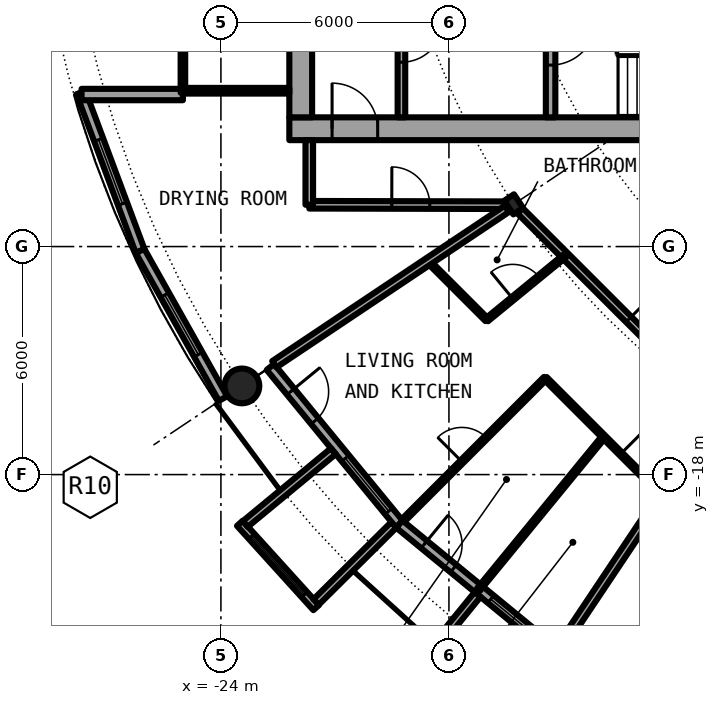
"""IFC4 building model, lengths in metres.
Left out: names, types, materials, properties, quantities, classifications, styles, units other than length and angle.
Written with IfcOpenShell. Run it as: python <this file> out.ifc"""

import sys

from ifc_helpers import new_model, si_unit, direction, frame, frame_2d, origin, origin_2d, place, context, subcontext, project, spatial, rectangle, circle, hollow_circle, i_section, extrude, element, fill, save


model = new_model("IFC4")
c1 = context("Model", 3, precision=1e-05, world=origin(), true_north=direction((0.0, 1.0)))
c2 = subcontext(c1, "Body", "Model", "MODEL_VIEW")
j1 = project(units=[si_unit("LENGTHUNIT", "METRE"), si_unit("PLANEANGLEUNIT", "RADIAN")], contexts=[c1])
p1 = place(None, origin())
s1 = spatial("IfcSite", under=j1, at=p1, CompositionType="ELEMENT")
p2 = place(p1, origin())
s2 = spatial("IfcBuilding", under=s1, at=p2, CompositionType="ELEMENT")
p3 = place(p2, frame((0.0, 0.0, 123.85)))
s3 = spatial("IfcBuildingStorey", under=s2, at=p3, CompositionType="ELEMENT", Elevation=123.85)
p4 = place(p3, frame((-23.448, -15.667, 0.0), z_axis=(0.0, 0.0, 1.0), x_axis=(1.0, 0.0, 0.0)))
e1 = element("IfcColumn", 1, at=p4, inside=s3, PredefinedType="COLUMN", context=c2, shape_type="SweptSolid", body=[
    extrude(hollow_circle(Radius=0.457, WallThickness=0.04, at=origin_2d()), origin(), (0.0, 0.0, 1.0), 3.05),
])
p5 = place(p3, frame((-16.297, -10.889, 0.0), z_axis=(0.0, 0.0, 1.0), x_axis=(-0.831469612303, -0.55557023302, 0.0)))
e2 = element("IfcColumn", 2, at=p5, inside=s3, PredefinedType="COLUMN", context=c2, shape_type="SweptSolid", body=[
    extrude(i_section(OverallWidth=0.307, OverallDepth=0.432, WebThickness=0.021, FlangeThickness=0.04, FilletRadius=0.027, at=origin_2d()), origin(), (0.0, 0.0, 1.0), 3.05),
])
p6 = place(p3, frame((-22.699, -15.167, 0.0), z_axis=(0.0, 0.0, 1.0), x_axis=(0.634382322723, -0.773019449054, 0.0)))
e3 = element("IfcWall", 3, at=p6, inside=s3, PredefinedType="SOLIDWALL", context=c2, shape_type="SweptSolid", body=[
    extrude(rectangle(XDim=5.352, YDim=0.25, at=frame_2d((2.676, 0.0))), origin(), (0.0, 0.0, 1.0), 2.7),
])
p7 = place(p6, frame((0.841, 0.0, 0.0)))
e4 = element("IfcOpeningElement", 4, at=p7, cuts=e3, PredefinedType="OPENING", context=c2, shape_type="SweptSolid", body=[
    extrude(rectangle(XDim=1.0, YDim=2.2, at=frame_2d((0.5, 1.1))), frame((0.0, 0.135, 0.0), z_axis=(0.0, -1.0, 0.0), x_axis=(1.0, 0.0, 0.0)), (0.0, 0.0, 1.0), 0.27),
])
p8 = place(p6, frame((3.111, 0.0, 0.3)))
e5 = element("IfcOpeningElement", 5, at=p8, cuts=e3, PredefinedType="OPENING", context=c2, shape_type="SweptSolid", body=[
    extrude(rectangle(XDim=1.8, YDim=2.1, at=frame_2d((0.9, 1.05))), frame((0.0, 0.135, 0.0), z_axis=(0.0, -1.0, 0.0), x_axis=(1.0, 0.0, 0.0)), (0.0, 0.0, 1.0), 0.27),
])
p9 = place(p3, frame((-23.503, -19.282, -0.03), z_axis=(0.0, 0.0, 1.0), x_axis=(0.671506829416, -0.740998365753, 0.0)))
e6 = element("IfcWall", 6, at=p9, inside=s3, PredefinedType="SOLIDWALL", context=c2, shape_type="SweptSolid", body=[
    extrude(rectangle(XDim=2.993, YDim=0.2, at=frame_2d((1.497, 0.0))), origin(), (0.0, 0.0, 1.0), 2.73),
])
p10 = place(p9, frame((0.457, 0.0, 0.33)))
e7 = element("IfcOpeningElement", 7, at=p10, cuts=e6, PredefinedType="OPENING", context=c2, shape_type="SweptSolid", body=[
    extrude(circle(Radius=1.04, at=frame_2d((1.04, 1.04))), frame((0.0, 0.11, 0.0), z_axis=(0.0, -1.0, 0.0), x_axis=(1.0, 0.0, 0.0)), (0.0, 0.0, 1.0), 0.22),
])
p11 = place(p3, frame((-21.041, -17.384, -0.03), z_axis=(0.0, 0.0, 1.0), x_axis=(-0.770784861449, -0.63709551667, 0.0)))
e8 = element("IfcWall", 8, at=p11, inside=s3, PredefinedType="SOLIDWALL", context=c2, shape_type="SweptSolid", body=[
    extrude(rectangle(XDim=3.006, YDim=0.2, at=frame_2d((1.503, 0.0))), origin(), (0.0, 0.0, 1.0), 2.73),
])
p12 = place(p3, frame((-19.45, -19.323, -0.03), z_axis=(0.0, 0.0, 1.0), x_axis=(-0.709727076896, -0.704476739375, 0.0)))
e9 = element("IfcWall", 9, at=p12, inside=s3, PredefinedType="SOLIDWALL", context=c2, shape_type="SweptSolid", body=[
    extrude(rectangle(XDim=2.883, YDim=0.2, at=frame_2d((1.441, 0.0))), origin(), (0.0, 0.0, 1.0), 2.73),
])
p13 = place(p3, frame((-19.304, -19.304, 0.0), z_axis=(0.0, 0.0, 1.0), x_axis=(0.773019449054, -0.634382322723, 0.0)))
e10 = element("IfcWall", 10, at=p13, inside=s3, PredefinedType="SOLIDWALL", context=c2, shape_type="SweptSolid", body=[
    extrude(rectangle(XDim=5.352, YDim=0.25, at=frame_2d((2.676, 0.0))), origin(), (0.0, 0.0, 1.0), 2.7),
])
p14 = place(p13, frame((0.841, 0.0, 0.0)))
e11 = element("IfcOpeningElement", 11, at=p14, cuts=e10, PredefinedType="OPENING", context=c2, shape_type="SweptSolid", body=[
    extrude(rectangle(XDim=1.0, YDim=2.2, at=frame_2d((0.5, 1.1))), frame((0.0, 0.135, 0.0), z_axis=(0.0, -1.0, 0.0), x_axis=(1.0, 0.0, 0.0)), (0.0, 0.0, 1.0), 0.27),
])
p15 = place(p13, frame((3.111, 0.0, 0.3)))
e12 = element("IfcOpeningElement", 12, at=p15, cuts=e10, PredefinedType="OPENING", context=c2, shape_type="SweptSolid", body=[
    extrude(rectangle(XDim=1.8, YDim=2.1, at=frame_2d((0.9, 1.05))), frame((0.0, 0.135, 0.0), z_axis=(0.0, -1.0, 0.0), x_axis=(1.0, 0.0, 0.0)), (0.0, 0.0, 1.0), 0.27),
])
p16 = place(p3, frame((-17.246, -21.155, -0.03), z_axis=(0.0, 0.0, 1.0), x_axis=(-0.631741648902, -0.775179004516, 0.0)))
e13 = element("IfcWall", 13, at=p16, inside=s3, PredefinedType="SOLIDWALL", context=c2, shape_type="SweptSolid", body=[
    extrude(rectangle(XDim=3.006, YDim=0.2, at=frame_2d((1.503, 0.0))), origin(), (0.0, 0.0, 1.0), 2.73),
])
p17 = place(p3, frame((-27.682, -7.945, 0.0), z_axis=(0.0, 0.0, 1.0), x_axis=(0.349247811493, -0.937030397675, 0.0)))
e14 = element("IfcWall", 14, at=p17, inside=s3, PredefinedType="SOLIDWALL", context=c2, shape_type="SweptSolid", body=[
    extrude(rectangle(XDim=4.452, YDim=0.25, at=frame_2d((2.226, 0.0))), origin(), (0.0, 0.0, 1.0), 2.7),
])
p18 = place(p17, frame((1.327, 0.0, 0.3)))
e15 = element("IfcOpeningElement", 15, at=p18, cuts=e14, PredefinedType="OPENING", context=c2, shape_type="SweptSolid", body=[
    extrude(rectangle(XDim=1.8, YDim=2.1, at=frame_2d((0.9, 1.05))), frame((0.0, 0.135, 0.0), z_axis=(0.0, -1.0, 0.0), x_axis=(1.0, 0.0, 0.0)), (0.0, 0.0, 1.0), 0.27),
])
p19 = place(p3, frame((-26.127, -12.117, 0.0), z_axis=(0.0, 0.0, 1.0), x_axis=(0.489696356642, -0.871893042919, 0.0)))
e16 = element("IfcWall", 16, at=p19, inside=s3, PredefinedType="SOLIDWALL", context=c2, shape_type="SweptSolid", body=[
    extrude(rectangle(XDim=4.454, YDim=0.25, at=frame_2d((2.227, 0.0))), origin(), (0.0, 0.0, 1.0), 2.7),
])
p20 = place(p19, frame((1.327, 0.0, 0.3)))
e17 = element("IfcOpeningElement", 17, at=p20, cuts=e16, PredefinedType="OPENING", context=c2, shape_type="SweptSolid", body=[
    extrude(rectangle(XDim=1.8, YDim=2.1, at=frame_2d((0.9, 1.05))), frame((0.0, 0.135, 0.0), z_axis=(0.0, -1.0, 0.0), x_axis=(1.0, 0.0, 0.0)), (0.0, 0.0, 1.0), 0.27),
])
p21 = place(p3, frame((-25.0, -8.0, 0.0), z_axis=(0.0, 0.0, 1.0), x_axis=(-1.0, 0.0, 0.0)))
e18 = element("IfcWall", 18, at=p21, inside=s3, PredefinedType="SOLIDWALL", context=c2, shape_type="SweptSolid", body=[
    extrude(rectangle(XDim=2.667, YDim=0.3, at=frame_2d((1.333, 0.0))), origin(), (0.0, 0.0, 1.0), 2.7),
])
p22 = place(p3, frame((-22.2, -8.9, 0.0), z_axis=(0.0, 0.0, 1.0), x_axis=(1.0, 0.0, 0.0)))
e19 = element("IfcWall", 19, at=p22, inside=s3, PredefinedType="SHEAR", context=c2, shape_type="SweptSolid", body=[
    extrude(rectangle(XDim=13.8, YDim=0.6, at=frame_2d((6.9, 0.0))), origin(), (0.0, 0.0, 1.0), 3.05),
])
p23 = place(p22, frame((1.125, 0.0, 0.0)))
e20 = element("IfcOpeningElement", 20, at=p23, cuts=e19, PredefinedType="OPENING", context=c2, shape_type="SweptSolid", body=[
    extrude(rectangle(XDim=1.2, YDim=2.3, at=frame_2d((0.6, 1.15))), frame((0.0, 0.31, 0.0), z_axis=(0.0, -1.0, 0.0), x_axis=(1.0, 0.0, 0.0)), (0.0, 0.0, 1.0), 0.62),
])
p24 = place(p3, frame((-21.9, -8.6, 0.0), z_axis=(0.0, 0.0, 1.0), x_axis=(0.0, 1.0, 0.0)))
e21 = element("IfcWall", 21, at=p24, inside=s3, PredefinedType="SHEAR", context=c2, shape_type="SweptSolid", body=[
    extrude(rectangle(XDim=17.2, YDim=0.6, at=frame_2d((8.6, 0.0))), origin(), (0.0, 0.0, 1.0), 3.05),
])
p25 = place(p24, frame((7.7, 0.0, 0.0)))
e22 = element("IfcOpeningElement", 22, at=p25, cuts=e21, PredefinedType="OPENING", context=c2, shape_type="SweptSolid", body=[
    extrude(rectangle(XDim=1.8, YDim=2.3, at=frame_2d((0.9, 1.15))), frame((0.0, 0.31, 0.0), z_axis=(0.0, -1.0, 0.0), x_axis=(1.0, 0.0, 0.0)), (0.0, 0.0, 1.0), 0.62),
])
p26 = place(p3, frame((-15.325, -4.65, 0.0), z_axis=(0.0, 0.0, 1.0), x_axis=(0.0, -1.0, 0.0)))
e23 = element("IfcWall", 23, at=p26, inside=s3, PredefinedType="SHEAR", context=c2, shape_type="SweptSolid", body=[
    extrude(rectangle(XDim=3.95, YDim=0.25, at=frame_2d((1.975, 0.0))), origin(), (0.0, 0.0, 1.0), 3.05),
])
p27 = place(p26, frame((1.375, 0.0, 0.0)))
e24 = element("IfcOpeningElement", 24, at=p27, cuts=e23, PredefinedType="OPENING", context=c2, shape_type="SweptSolid", body=[
    extrude(rectangle(XDim=1.2, YDim=2.3, at=frame_2d((0.6, 1.15))), frame((0.0, 0.135, 0.0), z_axis=(0.0, -1.0, 0.0), x_axis=(1.0, 0.0, 0.0)), (0.0, 0.0, 1.0), 0.27),
])
p28 = place(p3, frame((-19.25, -1.575, 0.0), z_axis=(0.0, 0.0, 1.0), x_axis=(0.0, -1.0, 0.0)))
e25 = element("IfcWall", 25, at=p28, inside=s3, PredefinedType="SOLIDWALL", context=c2, shape_type="SweptSolid", body=[
    extrude(rectangle(XDim=7.025, YDim=0.2, at=frame_2d((3.513, 0.0))), origin(), (0.0, 0.0, 1.0), 2.7),
])
p29 = place(p28, frame((4.475, 0.0, 0.0)))
e26 = element("IfcOpeningElement", 26, at=p29, cuts=e25, PredefinedType="OPENING", context=c2, shape_type="SweptSolid", body=[
    extrude(rectangle(XDim=1.1, YDim=2.3, at=frame_2d((0.55, 1.15))), frame((0.0, 0.11, 0.0), z_axis=(0.0, -1.0, 0.0), x_axis=(1.0, 0.0, 0.0)), (0.0, 0.0, 1.0), 0.22),
])
p30 = place(p3, frame((-22.2, -7.9, 0.0), z_axis=(0.0, 0.0, 1.0), x_axis=(-1.0, 0.0, 0.0)))
e27 = element("IfcWall", 27, at=p30, inside=s3, PredefinedType="PARTITIONING", context=c2, shape_type="SweptSolid", body=[
    extrude(rectangle(XDim=2.74, YDim=0.15, at=frame_2d((1.37, 0.0))), origin(), (0.0, 0.0, 1.0), 2.7),
])
p31 = place(p3, frame((-25.0, 7.95, 0.0), z_axis=(0.0, 0.0, 1.0), x_axis=(0.0, -1.0, 0.0)))
e28 = element("IfcWall", 28, at=p31, inside=s3, PredefinedType="PARTITIONING", context=c2, shape_type="SweptSolid", body=[
    extrude(rectangle(XDim=15.9, YDim=0.12, at=frame_2d((7.95, 0.0))), origin(), (0.0, 0.0, 1.0), 2.7),
])
p32 = place(p31, frame((0.95, 0.0, 0.1)))
e29 = element("IfcOpeningElement", 29, at=p32, cuts=e28, PredefinedType="OPENING", context=c2, shape_type="SweptSolid", body=[
    extrude(rectangle(XDim=14.0, YDim=2.35, at=frame_2d((7.0, 1.175))), frame((0.0, 0.07, 0.0), z_axis=(0.0, -1.0, 0.0), x_axis=(1.0, 0.0, 0.0)), (0.0, 0.0, 1.0), 0.14),
])
p33 = place(p3, frame((-18.542, -12.389, 0.0), z_axis=(0.0, 0.0, 1.0), x_axis=(0.707106781187, -0.707106781187, 0.0)))
e30 = element("IfcWall", 30, at=p33, inside=s3, PredefinedType="PARTITIONING", context=c2, shape_type="SweptSolid", body=[
    extrude(rectangle(XDim=2.175, YDim=0.1, at=frame_2d((1.088, 0.0))), origin(), (0.0, 0.0, 1.0), 2.7),
])
p34 = place(p3, frame((-15.463, -15.468, 0.0), z_axis=(0.0, 0.0, 1.0), x_axis=(0.707106781187, -0.707106781187, 0.0)))
e31 = element("IfcWall", 31, at=p34, inside=s3, PredefinedType="PARTITIONING", context=c2, shape_type="SweptSolid", body=[
    extrude(rectangle(XDim=4.351, YDim=0.1, at=frame_2d((2.176, 0.0))), origin(), (0.0, 0.0, 1.0), 2.7),
])
p35 = place(p34, frame((2.808, 0.0, 0.0)))
e32 = element("IfcOpeningElement", 32, at=p35, cuts=e31, PredefinedType="OPENING", context=c2, shape_type="SweptSolid", body=[
    extrude(rectangle(XDim=0.9, YDim=2.3, at=frame_2d((0.45, 1.15))), frame((0.0, 0.06, 0.0), z_axis=(0.0, -1.0, 0.0), x_axis=(1.0, 0.0, 0.0)), (0.0, 0.0, 1.0), 0.12),
])
p36 = place(p3, frame((-16.186, -11.0, 0.0), z_axis=(0.0, 0.0, 1.0), x_axis=(0.707106781187, -0.707106781187, 0.0)))
e33 = element("IfcWall", 33, at=p36, inside=s3, PredefinedType="PARTITIONING", context=c2, shape_type="SweptSolid", body=[
    extrude(rectangle(XDim=7.334, YDim=0.2, at=frame_2d((3.667, 0.0))), origin(), (0.0, 0.0, 1.0), 2.39),
])
p37 = place(p36, frame((4.123, 0.0, 0.0)))
e34 = element("IfcOpeningElement", 34, at=p37, cuts=e33, PredefinedType="OPENING", context=c2, shape_type="SweptSolid", body=[
    extrude(rectangle(XDim=1.0, YDim=2.3, at=frame_2d((0.5, 1.15))), frame((0.0, 0.11, 0.0), z_axis=(0.0, -1.0, 0.0), x_axis=(1.0, 0.0, 0.0)), (0.0, 0.0, 1.0), 0.22),
])
p38 = place(p3, frame((-21.675, -10.9, 0.0), z_axis=(0.0, 0.0, 1.0), x_axis=(0.999997173357, -0.002377662213, 0.0)))
e35 = element("IfcWall", 35, at=p38, inside=s3, PredefinedType="PARTITIONING", context=c2, shape_type="SweptSolid", body=[
    extrude(rectangle(XDim=5.134, YDim=0.2, at=frame_2d((2.567, 0.0))), origin(), (0.0, 0.0, 1.0), 2.7),
])
p39 = place(p38, frame((2.171, 0.0, 0.0)))
e36 = element("IfcOpeningElement", 36, at=p39, cuts=e35, PredefinedType="OPENING", context=c2, shape_type="SweptSolid", body=[
    extrude(rectangle(XDim=1.0, YDim=2.3, at=frame_2d((0.5, 1.15))), frame((0.0, 0.11, 0.0), z_axis=(0.0, -1.0, 0.0), x_axis=(1.0, 0.0, 0.0)), (0.0, 0.0, 1.0), 0.22),
])
p40 = place(p3, frame((-22.595, -15.097, 0.0), z_axis=(0.0, 0.0, 1.0), x_axis=(0.831467903109, 0.555572791, 0.0)))
e37 = element("IfcWall", 37, at=p40, inside=s3, PredefinedType="PARTITIONING", context=c2, shape_type="SweptSolid", body=[
    extrude(rectangle(XDim=7.358, YDim=0.2, at=frame_2d((3.679, 0.0))), origin(), (0.0, 0.0, 1.0), 2.7),
])
p41 = place(p3, frame((-19.216, -19.216, 0.0), z_axis=(0.0, 0.0, 1.0), x_axis=(0.707106781187, 0.707106781187, 0.0)))
e38 = element("IfcWall", 38, at=p41, inside=s3, PredefinedType="PARTITIONING", context=c2, shape_type="SweptSolid", body=[
    extrude(rectangle(XDim=5.305, YDim=0.1, at=frame_2d((2.652, 0.0))), origin(), (0.0, 0.0, 1.0), 2.7),
])
p42 = place(p41, frame((2.202, 0.0, 0.0)))
e39 = element("IfcOpeningElement", 39, at=p42, cuts=e38, PredefinedType="OPENING", context=c2, shape_type="SweptSolid", body=[
    extrude(rectangle(XDim=0.9, YDim=2.3, at=frame_2d((0.45, 1.15))), frame((0.0, 0.06, 0.0), z_axis=(0.0, -1.0, 0.0), x_axis=(1.0, 0.0, 0.0)), (0.0, 0.0, 1.0), 0.12),
])
p43 = place(p3, frame((-17.22, -21.023, 0.0), z_axis=(0.0, 0.0, 1.0), x_axis=(0.633774976367, 0.773517471898, 0.0)))
e40 = element("IfcWall", 40, at=p43, inside=s3, PredefinedType="PARTITIONING", context=c2, shape_type="SweptSolid", body=[
    extrude(rectangle(XDim=5.196, YDim=0.1, at=frame_2d((2.598, 0.0))), origin(), (0.0, 0.0, 1.0), 2.7),
])
p44 = place(p3, frame((-17.004, -13.927, 0.0), z_axis=(0.0, 0.0, 1.0), x_axis=(0.77367517848, 0.633582447834, 0.0)))
e41 = element("IfcWall", 41, at=p44, inside=s3, PredefinedType="PARTITIONING", context=c2, shape_type="SweptSolid", body=[
    extrude(rectangle(XDim=2.661, YDim=0.1, at=frame_2d((1.331, 0.0))), origin(), (0.0, 0.0, 1.0), 2.7),
])
p45 = place(p44, frame((0.881, 0.0, 0.0)))
e42 = element("IfcOpeningElement", 42, at=p45, cuts=e41, PredefinedType="OPENING", context=c2, shape_type="SweptSolid", body=[
    extrude(rectangle(XDim=0.9, YDim=2.3, at=frame_2d((0.45, 1.15))), frame((0.0, 0.06, 0.0), z_axis=(0.0, -1.0, 0.0), x_axis=(1.0, 0.0, 0.0)), (0.0, 0.0, 1.0), 0.12),
])
p46 = place(p3, frame((-15.1, -22.594, 0.0), z_axis=(0.0, 0.0, 1.0), x_axis=(0.555779189795, 0.831329953864, 0.0)))
e43 = element("IfcWall", 43, at=p46, inside=s3, PredefinedType="PARTITIONING", context=c2, shape_type="SweptSolid", body=[
    extrude(rectangle(XDim=7.359, YDim=0.2, at=frame_2d((3.68, 0.0))), origin(), (0.0, 0.0, 1.0), 2.7),
])
p47 = place(p3, frame((-21.675, -10.9, 0.0), z_axis=(0.0, 0.0, 1.0), x_axis=(0.0, 1.0, 0.0)))
e44 = element("IfcWall", 44, at=p47, inside=s3, PredefinedType="PARTITIONING", context=c2, shape_type="SweptSolid", body=[
    extrude(rectangle(XDim=1.7, YDim=0.2, at=frame_2d((0.85, 0.0))), origin(), (0.0, 0.0, 1.0), 2.7),
])
p48 = place(p7, origin())
e45 = element("IfcDoor", 45, at=p48, inside=s3, OperationType="SINGLE_SWING_LEFT", PredefinedType="DOOR", context=c2, shape_type="SweptSolid", body=[
    extrude(rectangle(XDim=1.0, YDim=2.2, at=frame_2d((0.5, 1.1))), frame((0.0, 0.025, 0.0), z_axis=(0.0, -1.0, 0.0), x_axis=(1.0, 0.0, 0.0)), (0.0, 0.0, 1.0), 0.05),
])
fill(e4, e45)
p49 = place(p8, origin())
e46 = element("IfcWindow", 46, at=p49, inside=s3, PartitioningType="SINGLE_PANEL", PredefinedType="WINDOW", context=c2, shape_type="SweptSolid", body=[
    extrude(rectangle(XDim=1.8, YDim=2.1, at=frame_2d((0.9, 1.05))), frame((0.0, 0.03, 0.0), z_axis=(0.0, -1.0, 0.0), x_axis=(1.0, 0.0, 0.0)), (0.0, 0.0, 1.0), 0.06),
])
fill(e5, e46)
p50 = place(p10, origin())
e47 = element("IfcWindow", 47, at=p50, inside=s3, PartitioningType="SINGLE_PANEL", PredefinedType="WINDOW", context=c2, shape_type="SweptSolid", body=[
    extrude(circle(Radius=1.04, at=frame_2d((1.04, 1.04))), frame((0.0, 0.03, 0.0), z_axis=(0.0, -1.0, 0.0), x_axis=(1.0, 0.0, 0.0)), (0.0, 0.0, 1.0), 0.06),
])
fill(e7, e47)
p51 = place(p14, origin())
e48 = element("IfcDoor", 48, at=p51, inside=s3, OperationType="SINGLE_SWING_LEFT", PredefinedType="DOOR", context=c2, shape_type="SweptSolid", body=[
    extrude(rectangle(XDim=1.0, YDim=2.2, at=frame_2d((0.5, 1.1))), frame((0.0, 0.025, 0.0), z_axis=(0.0, -1.0, 0.0), x_axis=(1.0, 0.0, 0.0)), (0.0, 0.0, 1.0), 0.05),
])
fill(e11, e48)
p52 = place(p15, origin())
e49 = element("IfcWindow", 49, at=p52, inside=s3, PartitioningType="SINGLE_PANEL", PredefinedType="WINDOW", context=c2, shape_type="SweptSolid", body=[
    extrude(rectangle(XDim=1.8, YDim=2.1, at=frame_2d((0.9, 1.05))), frame((0.0, 0.03, 0.0), z_axis=(0.0, -1.0, 0.0), x_axis=(1.0, 0.0, 0.0)), (0.0, 0.0, 1.0), 0.06),
])
fill(e12, e49)
p53 = place(p18, origin())
e50 = element("IfcWindow", 50, at=p53, inside=s3, PartitioningType="SINGLE_PANEL", PredefinedType="WINDOW", context=c2, shape_type="SweptSolid", body=[
    extrude(rectangle(XDim=1.8, YDim=2.1, at=frame_2d((0.9, 1.05))), frame((0.0, 0.03, 0.0), z_axis=(0.0, -1.0, 0.0), x_axis=(1.0, 0.0, 0.0)), (0.0, 0.0, 1.0), 0.06),
])
fill(e15, e50)
p54 = place(p20, origin())
e51 = element("IfcWindow", 51, at=p54, inside=s3, PartitioningType="SINGLE_PANEL", PredefinedType="WINDOW", context=c2, shape_type="SweptSolid", body=[
    extrude(rectangle(XDim=1.8, YDim=2.1, at=frame_2d((0.9, 1.05))), frame((0.0, 0.03, 0.0), z_axis=(0.0, -1.0, 0.0), x_axis=(1.0, 0.0, 0.0)), (0.0, 0.0, 1.0), 0.06),
])
fill(e17, e51)
p55 = place(p27, origin())
e52 = element("IfcDoor", 52, at=p55, inside=s3, OperationType="SINGLE_SWING_LEFT", PredefinedType="DOOR", context=c2, shape_type="SweptSolid", body=[
    extrude(rectangle(XDim=1.2, YDim=2.3, at=frame_2d((0.6, 1.15))), frame((0.0, 0.025, 0.0), z_axis=(0.0, -1.0, 0.0), x_axis=(1.0, 0.0, 0.0)), (0.0, 0.0, 1.0), 0.05),
])
fill(e24, e52)
p56 = place(p29, origin())
e53 = element("IfcDoor", 53, at=p56, inside=s3, OperationType="SINGLE_SWING_LEFT", PredefinedType="DOOR", context=c2, shape_type="SweptSolid", body=[
    extrude(rectangle(XDim=1.1, YDim=2.3, at=frame_2d((0.55, 1.15))), frame((0.0, 0.025, 0.0), z_axis=(0.0, -1.0, 0.0), x_axis=(1.0, 0.0, 0.0)), (0.0, 0.0, 1.0), 0.05),
])
fill(e26, e53)
p57 = place(p23, origin())
e54 = element("IfcDoor", 54, at=p57, inside=s3, OperationType="SINGLE_SWING_RIGHT", PredefinedType="DOOR", context=c2, shape_type="SweptSolid", body=[
    extrude(rectangle(XDim=1.2, YDim=2.3, at=frame_2d((0.6, 1.15))), frame((0.0, 0.025, 0.0), z_axis=(0.0, -1.0, 0.0), x_axis=(1.0, 0.0, 0.0)), (0.0, 0.0, 1.0), 0.05),
])
fill(e20, e54)
p58 = place(p32, origin())
e55 = element("IfcWindow", 55, at=p58, inside=s3, PartitioningType="SINGLE_PANEL", PredefinedType="WINDOW", context=c2, shape_type="SweptSolid", body=[
    extrude(rectangle(XDim=14.0, YDim=2.35, at=frame_2d((7.0, 1.175))), frame((0.0, 0.03, 0.0), z_axis=(0.0, -1.0, 0.0), x_axis=(1.0, 0.0, 0.0)), (0.0, 0.0, 1.0), 0.06),
])
fill(e29, e55)
p59 = place(p37, origin())
e56 = element("IfcDoor", 56, at=p59, inside=s3, OperationType="SINGLE_SWING_RIGHT", PredefinedType="DOOR", context=c2, shape_type="SweptSolid", body=[
    extrude(rectangle(XDim=1.0, YDim=2.3, at=frame_2d((0.5, 1.15))), frame((0.0, 0.025, 0.0), z_axis=(0.0, -1.0, 0.0), x_axis=(1.0, 0.0, 0.0)), (0.0, 0.0, 1.0), 0.05),
])
fill(e34, e56)
p60 = place(p45, origin())
e57 = element("IfcDoor", 57, at=p60, inside=s3, OperationType="SINGLE_SWING_RIGHT", PredefinedType="DOOR", context=c2, shape_type="SweptSolid", body=[
    extrude(rectangle(XDim=0.9, YDim=2.3, at=frame_2d((0.45, 1.15))), frame((0.0, 0.025, 0.0), z_axis=(0.0, -1.0, 0.0), x_axis=(1.0, 0.0, 0.0)), (0.0, 0.0, 1.0), 0.05),
])
fill(e42, e57)
p61 = place(p42, origin())
e58 = element("IfcDoor", 58, at=p61, inside=s3, OperationType="SINGLE_SWING_LEFT", PredefinedType="DOOR", context=c2, shape_type="SweptSolid", body=[
    extrude(rectangle(XDim=0.9, YDim=2.3, at=frame_2d((0.45, 1.15))), frame((0.0, 0.025, 0.0), z_axis=(0.0, -1.0, 0.0), x_axis=(1.0, 0.0, 0.0)), (0.0, 0.0, 1.0), 0.05),
])
fill(e39, e58)
p62 = place(p35, origin())
e59 = element("IfcDoor", 59, at=p62, inside=s3, OperationType="SINGLE_SWING_RIGHT", PredefinedType="DOOR", context=c2, shape_type="SweptSolid", body=[
    extrude(rectangle(XDim=0.9, YDim=2.3, at=frame_2d((0.45, 1.15))), frame((0.0, 0.025, 0.0), z_axis=(0.0, -1.0, 0.0), x_axis=(1.0, 0.0, 0.0)), (0.0, 0.0, 1.0), 0.05),
])
fill(e32, e59)
p63 = place(p39, origin())
e60 = element("IfcDoor", 60, at=p63, inside=s3, OperationType="SINGLE_SWING_RIGHT", PredefinedType="DOOR", context=c2, shape_type="SweptSolid", body=[
    extrude(rectangle(XDim=1.0, YDim=2.3, at=frame_2d((0.5, 1.15))), frame((0.0, 0.025, 0.0), z_axis=(0.0, -1.0, 0.0), x_axis=(1.0, 0.0, 0.0)), (0.0, 0.0, 1.0), 0.05),
])
fill(e36, e60)
save(model, sys.argv[1])
